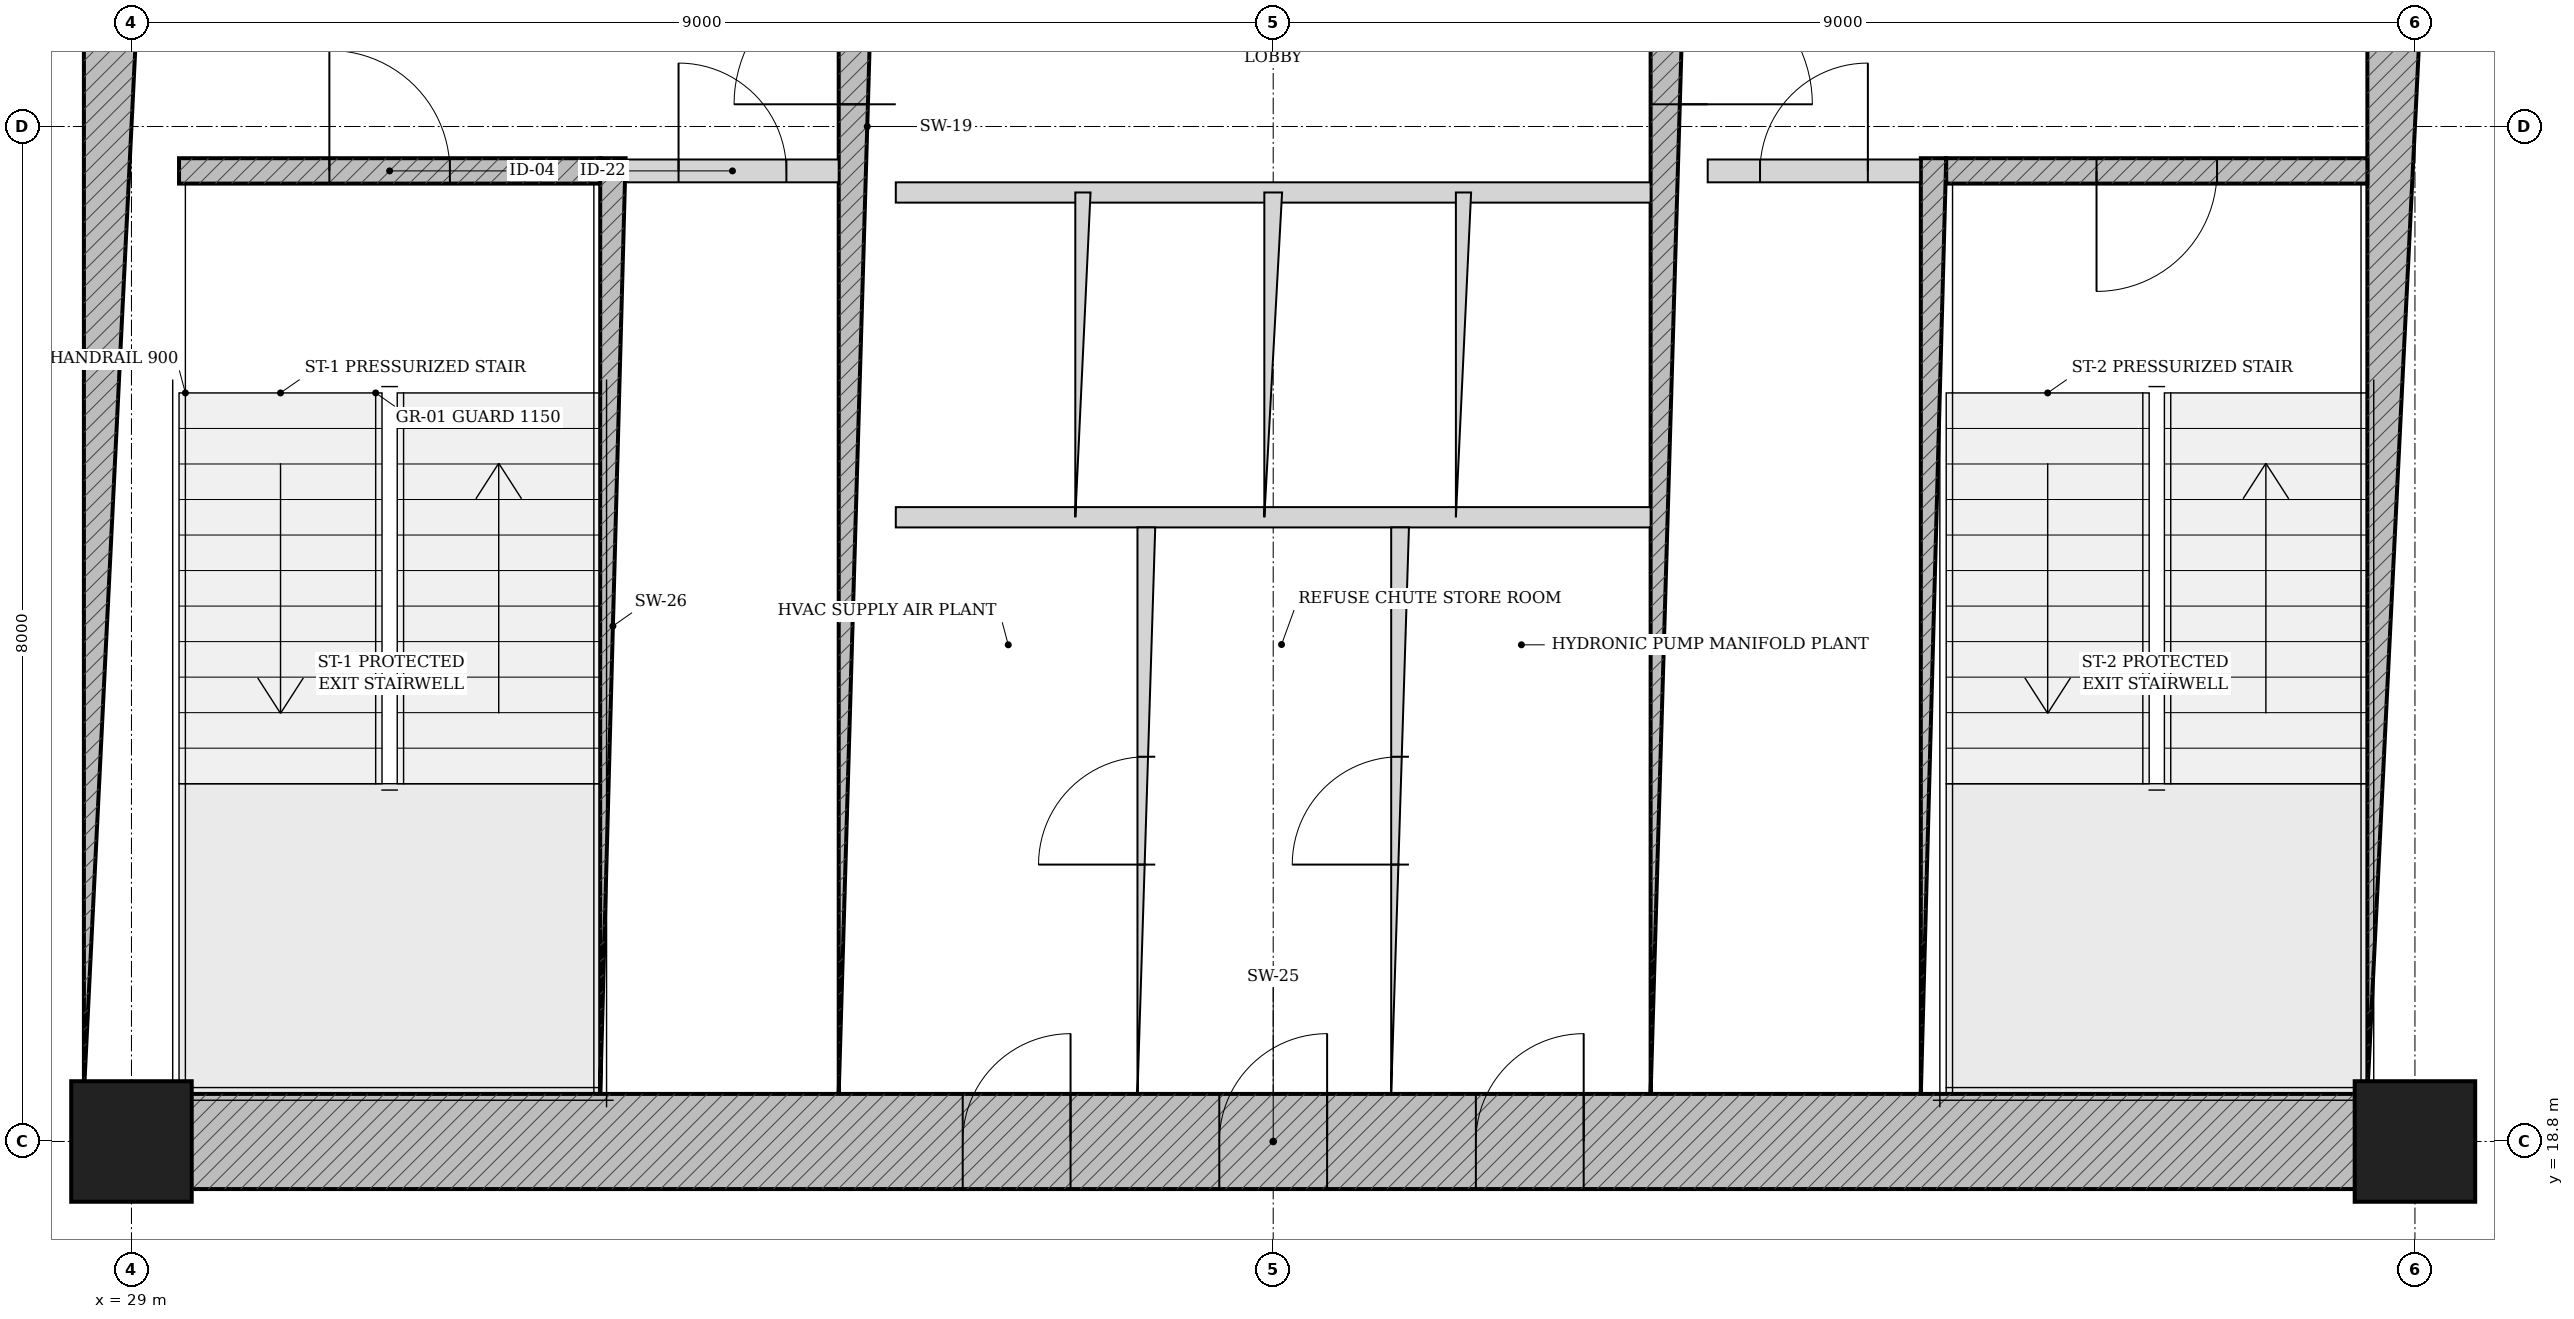
"""IFC4 building model, lengths in metres.
Left out: names, types, materials, properties, quantities, classifications, styles, units other than length and angle.
Written with IfcOpenShell. Run it as: python <this file> out.ifc"""

import sys

from ifc_helpers import new_model, si_unit, direction, frame, frame_2d, origin, origin_2d, place, context, subcontext, project, spatial, rectangle, extrude, source, transform, mapped, element, fill, save


model = new_model("IFC4")
c1 = context("Model", 3, precision=1e-05, world=origin(), true_north=direction((-0.2419218956, 0.970295726276)))
c2 = subcontext(c1, "Body", "Model", "MODEL_VIEW")
j1 = project(units=[si_unit("LENGTHUNIT", "METRE"), si_unit("PLANEANGLEUNIT", "RADIAN")], contexts=[c1])
p1 = place(None, origin())
s1 = spatial("IfcSite", under=j1, at=p1, CompositionType="ELEMENT")
p2 = place(p1, origin())
s2 = spatial("IfcBuilding", under=s1, at=p2, CompositionType="ELEMENT")
p3 = place(p2, frame((0.0, 0.0, -4.2)))
s3 = spatial("IfcBuildingStorey", under=s2, at=p3, CompositionType="ELEMENT", Elevation=-4.2)
for number, where, z_axis, x_axis in (
    (1, (29.0, 18.8, 0.0), (0.0, 0.0, 1.0), (1.0, 0.0, 0.0)),
    (2, (47.0, 18.8, 0.0), (0.0, 0.0, 1.0), (1.0, 0.0, 0.0)),
):
    element("IfcColumn", number, at=place(p3, frame(where, z_axis=z_axis, x_axis=x_axis)), inside=s3, PredefinedType="COLUMN", context=c2, shape_type="SweptSolid", body=[
        extrude(rectangle(XDim=1.1, YDim=1.1, at=origin_2d()), origin(), (0.0, 0.0, 1.0), 4.2),
    ])
p4 = place(p3, frame((28.625, 18.8, 0.0), z_axis=(0.0, 0.0, 1.0), x_axis=(1.0, 0.0, 0.0)))
e3 = element("IfcWall", 3, at=p4, inside=s3, PredefinedType="SHEAR", context=c2, shape_type="SweptSolid", body=[
    extrude(rectangle(XDim=18.75, YDim=0.75, at=frame_2d((9.375, 0.0))), origin(), (0.0, 0.0, 1.0), 3.78),
])
p5 = place(p4, frame((6.927, 0.0, 0.0)))
e4 = element("IfcOpeningElement", 4, at=p5, cuts=e3, PredefinedType="OPENING", context=c2, shape_type="SweptSolid", body=[
    extrude(rectangle(XDim=0.85, YDim=2.1, at=frame_2d((0.425, 1.05))), frame((0.0, 0.385, 0.0), z_axis=(0.0, -1.0, 0.0), x_axis=(1.0, 0.0, 0.0)), (0.0, 0.0, 1.0), 0.77),
])
p6 = place(p4, frame((8.95, 0.0, 0.0)))
e5 = element("IfcOpeningElement", 5, at=p6, cuts=e3, PredefinedType="OPENING", context=c2, shape_type="SweptSolid", body=[
    extrude(rectangle(XDim=0.85, YDim=2.1, at=frame_2d((0.425, 1.05))), frame((0.0, 0.385, 0.0), z_axis=(0.0, -1.0, 0.0), x_axis=(1.0, 0.0, 0.0)), (0.0, 0.0, 1.0), 0.77),
])
p7 = place(p4, frame((10.972, 0.0, 0.0)))
e6 = element("IfcOpeningElement", 6, at=p7, cuts=e3, PredefinedType="OPENING", context=c2, shape_type="SweptSolid", body=[
    extrude(rectangle(XDim=0.85, YDim=2.1, at=frame_2d((0.425, 1.05))), frame((0.0, 0.385, 0.0), z_axis=(0.0, -1.0, 0.0), x_axis=(1.0, 0.0, 0.0)), (0.0, 0.0, 1.0), 0.77),
])
p8 = place(p3, frame((29.0, 19.175, 0.0), z_axis=(0.0, 0.0, 1.0), x_axis=(0.0, 1.0, 0.0)))
e7 = element("IfcWall", 7, at=p8, inside=s3, PredefinedType="SHEAR", context=c2, shape_type="SweptSolid", body=[
    extrude(rectangle(XDim=15.25, YDim=0.75, at=frame_2d((7.625, 0.0))), origin(), (0.0, 0.0, 1.0), 3.78),
])
p9 = place(p8, frame((9.875, 0.0, 0.0)))
e8 = element("IfcOpeningElement", 8, at=p9, cuts=e7, PredefinedType="OPENING", context=c2, shape_type="SweptSolid", body=[
    extrude(rectangle(XDim=1.5, YDim=2.2, at=frame_2d((0.75, 1.1))), frame((0.0, 0.385, 0.0), z_axis=(0.0, -1.0, 0.0), x_axis=(1.0, 0.0, 0.0)), (0.0, 0.0, 1.0), 0.77),
])
p10 = place(p3, frame((47.0, 19.175, 0.0), z_axis=(0.0, 0.0, 1.0), x_axis=(0.0, 1.0, 0.0)))
e9 = element("IfcWall", 9, at=p10, inside=s3, PredefinedType="SHEAR", context=c2, shape_type="SweptSolid", body=[
    extrude(rectangle(XDim=15.25, YDim=0.75, at=frame_2d((7.625, 0.0))), origin(), (0.0, 0.0, 1.0), 3.78),
])
p11 = place(p10, frame((9.875, 0.0, 0.0)))
e10 = element("IfcOpeningElement", 10, at=p11, cuts=e9, PredefinedType="OPENING", context=c2, shape_type="SweptSolid", body=[
    extrude(rectangle(XDim=1.5, YDim=2.2, at=frame_2d((0.75, 1.1))), frame((0.0, 0.385, 0.0), z_axis=(0.0, -1.0, 0.0), x_axis=(1.0, 0.0, 0.0)), (0.0, 0.0, 1.0), 0.77),
])
p12 = place(p3, frame((32.795, 19.175, 0.0), z_axis=(0.0, 0.0, 1.0), x_axis=(0.0, 1.0, 0.0)))
e11 = element("IfcWall", 11, at=p12, inside=s3, PredefinedType="SOLIDWALL", context=c2, shape_type="SweptSolid", body=[
    extrude(rectangle(XDim=7.375, YDim=0.2, at=frame_2d((3.688, 0.0))), origin(), (0.0, 0.0, 1.0), 3.78),
])
p13 = place(p3, frame((29.375, 26.45, 0.0), z_axis=(0.0, 0.0, 1.0), x_axis=(1.0, 0.0, 0.0)))
e12 = element("IfcWall", 12, at=p13, inside=s3, PredefinedType="SOLIDWALL", context=c2, shape_type="SweptSolid", body=[
    extrude(rectangle(XDim=3.32, YDim=0.2, at=frame_2d((1.66, 0.0))), origin(), (0.0, 0.0, 1.0), 3.78),
])
p14 = place(p13, frame((1.185, 0.0, 0.0)))
e13 = element("IfcOpeningElement", 13, at=p14, cuts=e12, PredefinedType="OPENING", context=c2, shape_type="SweptSolid", body=[
    extrude(rectangle(XDim=0.95, YDim=2.15, at=frame_2d((0.475, 1.075))), frame((0.0, 0.11, 0.0), z_axis=(0.0, -1.0, 0.0), x_axis=(1.0, 0.0, 0.0)), (0.0, 0.0, 1.0), 0.22),
])
p15 = place(p3, frame((43.205, 19.175, 0.0), z_axis=(0.0, 0.0, 1.0), x_axis=(0.0, 1.0, 0.0)))
e14 = element("IfcWall", 14, at=p15, inside=s3, PredefinedType="SOLIDWALL", context=c2, shape_type="SweptSolid", body=[
    extrude(rectangle(XDim=7.375, YDim=0.2, at=frame_2d((3.688, 0.0))), origin(), (0.0, 0.0, 1.0), 3.78),
])
p16 = place(p3, frame((43.305, 26.45, 0.0), z_axis=(0.0, 0.0, 1.0), x_axis=(1.0, 0.0, 0.0)))
e15 = element("IfcWall", 15, at=p16, inside=s3, PredefinedType="SOLIDWALL", context=c2, shape_type="SweptSolid", body=[
    extrude(rectangle(XDim=3.32, YDim=0.2, at=frame_2d((1.66, 0.0))), origin(), (0.0, 0.0, 1.0), 3.78),
])
p17 = place(p16, frame((1.185, 0.0, 0.0)))
e16 = element("IfcOpeningElement", 16, at=p17, cuts=e15, PredefinedType="OPENING", context=c2, shape_type="SweptSolid", body=[
    extrude(rectangle(XDim=0.95, YDim=2.15, at=frame_2d((0.475, 1.075))), frame((0.0, 0.11, 0.0), z_axis=(0.0, -1.0, 0.0), x_axis=(1.0, 0.0, 0.0)), (0.0, 0.0, 1.0), 0.22),
])
p18 = place(p3, frame((34.8, 19.175, 0.0), z_axis=(0.0, 0.0, 1.0), x_axis=(0.0, 1.0, 0.0)))
e17 = element("IfcWall", 17, at=p18, inside=s3, PredefinedType="SHEAR", context=c2, shape_type="SweptSolid", body=[
    extrude(rectangle(XDim=15.25, YDim=0.45, at=frame_2d((7.625, 0.0))), origin(), (0.0, 0.0, 1.0), 3.78),
])
p19 = place(p18, frame((7.8, 0.0, 0.0)))
e18 = element("IfcOpeningElement", 18, at=p19, cuts=e17, PredefinedType="OPENING", context=c2, shape_type="SweptSolid", body=[
    extrude(rectangle(XDim=1.05, YDim=2.15, at=frame_2d((0.525, 1.075))), frame((0.0, 0.235, 0.0), z_axis=(0.0, -1.0, 0.0), x_axis=(1.0, 0.0, 0.0)), (0.0, 0.0, 1.0), 0.47),
])
p20 = place(p3, frame((41.2, 19.175, 0.0), z_axis=(0.0, 0.0, 1.0), x_axis=(0.0, 1.0, 0.0)))
e19 = element("IfcWall", 19, at=p20, inside=s3, PredefinedType="SHEAR", context=c2, shape_type="SweptSolid", body=[
    extrude(rectangle(XDim=15.25, YDim=0.45, at=frame_2d((7.625, 0.0))), origin(), (0.0, 0.0, 1.0), 3.78),
])
p21 = place(p20, frame((7.8, 0.0, 0.0)))
e20 = element("IfcOpeningElement", 20, at=p21, cuts=e19, PredefinedType="OPENING", context=c2, shape_type="SweptSolid", body=[
    extrude(rectangle(XDim=1.05, YDim=2.15, at=frame_2d((0.525, 1.075))), frame((0.0, 0.235, 0.0), z_axis=(0.0, -1.0, 0.0), x_axis=(1.0, 0.0, 0.0)), (0.0, 0.0, 1.0), 0.47),
])
p22 = place(p3, frame((32.9, 26.45, 0.0), z_axis=(0.0, 0.0, 1.0), x_axis=(1.0, 0.0, 0.0)))
e21 = element("IfcWall", 21, at=p22, inside=s3, PredefinedType="PARTITIONING", context=c2, shape_type="SweptSolid", body=[
    extrude(rectangle(XDim=1.675, YDim=0.18, at=frame_2d((0.837, 0.0))), origin(), (0.0, 0.0, 1.0), 3.78),
])
p23 = place(p22, frame((0.413, 0.0, 0.0)))
e22 = element("IfcOpeningElement", 22, at=p23, cuts=e21, PredefinedType="OPENING", context=c2, shape_type="SweptSolid", body=[
    extrude(rectangle(XDim=0.85, YDim=2.1, at=frame_2d((0.425, 1.05))), frame((0.0, 0.1, 0.0), z_axis=(0.0, -1.0, 0.0), x_axis=(1.0, 0.0, 0.0)), (0.0, 0.0, 1.0), 0.2),
])
p24 = place(p3, frame((41.425, 26.45, 0.0), z_axis=(0.0, 0.0, 1.0), x_axis=(1.0, 0.0, 0.0)))
e23 = element("IfcWall", 23, at=p24, inside=s3, PredefinedType="PARTITIONING", context=c2, shape_type="SweptSolid", body=[
    extrude(rectangle(XDim=1.675, YDim=0.18, at=frame_2d((0.837, 0.0))), origin(), (0.0, 0.0, 1.0), 3.78),
])
p25 = place(p24, frame((0.413, 0.0, 0.0)))
e24 = element("IfcOpeningElement", 24, at=p25, cuts=e23, PredefinedType="OPENING", context=c2, shape_type="SweptSolid", body=[
    extrude(rectangle(XDim=0.85, YDim=2.1, at=frame_2d((0.425, 1.05))), frame((0.0, 0.1, 0.0), z_axis=(0.0, -1.0, 0.0), x_axis=(1.0, 0.0, 0.0)), (0.0, 0.0, 1.0), 0.2),
])
for number, where, z_axis, x_axis in (
    (25, (35.025, 26.28, 0.0), (0.0, 0.0, 1.0), (1.0, 0.0, 0.0)),
    (26, (35.025, 23.72, 0.0), (0.0, 0.0, 1.0), (1.0, 0.0, 0.0)),
):
    element("IfcWall", number, at=place(p3, frame(where, z_axis=z_axis, x_axis=x_axis)), inside=s3, PredefinedType="PARTITIONING", context=c2, shape_type="SweptSolid", body=[
        extrude(rectangle(XDim=5.95, YDim=0.16, at=frame_2d((2.975, 0.0))), origin(), (0.0, 0.0, 1.0), 3.78),
    ])
p26 = place(p3, frame((36.5, 23.72, 0.0), z_axis=(0.0, 0.0, 1.0), x_axis=(0.0, 1.0, 0.0)))
e27 = element("IfcWall", 27, at=p26, inside=s3, PredefinedType="PARTITIONING", context=c2, shape_type="SweptSolid", body=[
    extrude(rectangle(XDim=2.56, YDim=0.12, at=frame_2d((1.28, 0.0))), origin(), (0.0, 0.0, 1.0), 3.78),
])
p27 = place(p3, frame((38.0, 23.72, 0.0), z_axis=(0.0, 0.0, 1.0), x_axis=(0.0, 1.0, 0.0)))
e28 = element("IfcWall", 28, at=p27, inside=s3, PredefinedType="PARTITIONING", context=c2, shape_type="SweptSolid", body=[
    extrude(rectangle(XDim=2.56, YDim=0.14, at=frame_2d((1.28, 0.0))), origin(), (0.0, 0.0, 1.0), 3.78),
])
p28 = place(p3, frame((39.5, 23.72, 0.0), z_axis=(0.0, 0.0, 1.0), x_axis=(0.0, 1.0, 0.0)))
e29 = element("IfcWall", 29, at=p28, inside=s3, PredefinedType="PARTITIONING", context=c2, shape_type="SweptSolid", body=[
    extrude(rectangle(XDim=2.56, YDim=0.12, at=frame_2d((1.28, 0.0))), origin(), (0.0, 0.0, 1.0), 3.78),
])
p29 = place(p3, frame((37.0, 19.175, 0.0), z_axis=(0.0, 0.0, 1.0), x_axis=(0.0, 1.0, 0.0)))
e30 = element("IfcWall", 30, at=p29, inside=s3, PredefinedType="PARTITIONING", context=c2, shape_type="SweptSolid", body=[
    extrude(rectangle(XDim=4.465, YDim=0.14, at=frame_2d((2.232, 0.0))), origin(), (0.0, 0.0, 1.0), 3.78),
])
p30 = place(p29, frame((1.808, 0.0, 0.0)))
e31 = element("IfcOpeningElement", 31, at=p30, cuts=e30, PredefinedType="OPENING", context=c2, shape_type="SweptSolid", body=[
    extrude(rectangle(XDim=0.85, YDim=2.1, at=frame_2d((0.425, 1.05))), frame((0.0, 0.08, 0.0), z_axis=(0.0, -1.0, 0.0), x_axis=(1.0, 0.0, 0.0)), (0.0, 0.0, 1.0), 0.16),
])
p31 = place(p3, frame((39.0, 19.175, 0.0), z_axis=(0.0, 0.0, 1.0), x_axis=(0.0, 1.0, 0.0)))
e32 = element("IfcWall", 32, at=p31, inside=s3, PredefinedType="PARTITIONING", context=c2, shape_type="SweptSolid", body=[
    extrude(rectangle(XDim=4.465, YDim=0.14, at=frame_2d((2.232, 0.0))), origin(), (0.0, 0.0, 1.0), 3.78),
])
p32 = place(p31, frame((1.808, 0.0, 0.0)))
e33 = element("IfcOpeningElement", 33, at=p32, cuts=e32, PredefinedType="OPENING", context=c2, shape_type="SweptSolid", body=[
    extrude(rectangle(XDim=0.85, YDim=2.1, at=frame_2d((0.425, 1.05))), frame((0.0, 0.08, 0.0), z_axis=(0.0, -1.0, 0.0), x_axis=(1.0, 0.0, 0.0)), (0.0, 0.0, 1.0), 0.16),
])
m1 = source(origin(), c2, "Body", "SweptSolid", [
    extrude(rectangle(XDim=1.05, YDim=2.15, at=frame_2d((0.525, 1.075))), frame((0.0, 0.025, 0.0), z_axis=(0.0, -1.0, 0.0), x_axis=(1.0, 0.0, 0.0)), (0.0, 0.0, 1.0), 0.05),
])
p33 = place(p19, origin())
e34 = element("IfcDoor", 34, at=p33, inside=s3, OperationType="SINGLE_SWING_LEFT", PredefinedType="DOOR", context=c2, shape_type="MappedRepresentation", body=[
    mapped(m1, transform((0.0, 0.0, 0.0), scale=1.0)),
])
fill(e18, e34)
p34 = place(p21, frame((1.05, 0.0, 0.0), z_axis=(0.0, 0.0, 1.0), x_axis=(-1.0, 0.0, 0.0)))
e35 = element("IfcDoor", 35, at=p34, inside=s3, OperationType="SINGLE_SWING_RIGHT", PredefinedType="DOOR", context=c2, shape_type="MappedRepresentation", body=[
    mapped(m1, transform((0.0, 0.0, 0.0), scale=1.0)),
])
fill(e20, e35)
m2 = source(origin(), c2, "Body", "SweptSolid", [
    extrude(rectangle(XDim=0.95, YDim=2.15, at=frame_2d((0.475, 1.075))), frame((0.0, 0.025, 0.0), z_axis=(0.0, -1.0, 0.0), x_axis=(1.0, 0.0, 0.0)), (0.0, 0.0, 1.0), 0.05),
])
p35 = place(p14, origin())
e36 = element("IfcDoor", 36, at=p35, inside=s3, OperationType="SINGLE_SWING_LEFT", PredefinedType="DOOR", context=c2, shape_type="MappedRepresentation", body=[
    mapped(m2, transform((0.0, 0.0, 0.0), scale=1.0)),
])
fill(e13, e36)
p36 = place(p17, frame((0.95, 0.0, 0.0), z_axis=(0.0, 0.0, 1.0), x_axis=(-1.0, 0.0, 0.0)))
e37 = element("IfcDoor", 37, at=p36, inside=s3, OperationType="SINGLE_SWING_RIGHT", PredefinedType="DOOR", context=c2, shape_type="MappedRepresentation", body=[
    mapped(m2, transform((0.0, 0.0, 0.0), scale=1.0)),
])
fill(e16, e37)
m3 = source(origin(), c2, "Body", "SweptSolid", [
    extrude(rectangle(XDim=0.85, YDim=2.1, at=frame_2d((0.425, 1.05))), frame((0.0, 0.025, 0.0), z_axis=(0.0, -1.0, 0.0), x_axis=(1.0, 0.0, 0.0)), (0.0, 0.0, 1.0), 0.05),
])
p37 = place(p23, origin())
e38 = element("IfcDoor", 38, at=p37, inside=s3, OperationType="SINGLE_SWING_LEFT", PredefinedType="DOOR", context=c2, shape_type="MappedRepresentation", body=[
    mapped(m3, transform((0.0, 0.0, 0.0), scale=1.0)),
])
fill(e22, e38)
p38 = place(p25, origin())
e39 = element("IfcDoor", 39, at=p38, inside=s3, OperationType="SINGLE_SWING_RIGHT", PredefinedType="DOOR", context=c2, shape_type="MappedRepresentation", body=[
    mapped(m3, transform((0.0, 0.0, 0.0), scale=1.0)),
])
fill(e24, e39)
p39 = place(p5, origin())
e40 = element("IfcDoor", 40, at=p39, inside=s3, OperationType="SINGLE_SWING_RIGHT", PredefinedType="DOOR", context=c2, shape_type="MappedRepresentation", body=[
    mapped(m3, transform((0.0, 0.0, 0.0), scale=1.0)),
])
fill(e4, e40)
p40 = place(p6, origin())
e41 = element("IfcDoor", 41, at=p40, inside=s3, OperationType="SINGLE_SWING_RIGHT", PredefinedType="DOOR", context=c2, shape_type="MappedRepresentation", body=[
    mapped(m3, transform((0.0, 0.0, 0.0), scale=1.0)),
])
fill(e5, e41)
p41 = place(p7, origin())
e42 = element("IfcDoor", 42, at=p41, inside=s3, OperationType="SINGLE_SWING_RIGHT", PredefinedType="DOOR", context=c2, shape_type="MappedRepresentation", body=[
    mapped(m3, transform((0.0, 0.0, 0.0), scale=1.0)),
])
fill(e6, e42)
p42 = place(p30, origin())
e43 = element("IfcDoor", 43, at=p42, inside=s3, OperationType="SINGLE_SWING_LEFT", PredefinedType="DOOR", context=c2, shape_type="MappedRepresentation", body=[
    mapped(m3, transform((0.0, 0.0, 0.0), scale=1.0)),
])
fill(e31, e43)
p43 = place(p32, origin())
e44 = element("IfcDoor", 44, at=p43, inside=s3, OperationType="SINGLE_SWING_LEFT", PredefinedType="DOOR", context=c2, shape_type="MappedRepresentation", body=[
    mapped(m3, transform((0.0, 0.0, 0.0), scale=1.0)),
])
fill(e33, e44)
save(model, sys.argv[1])
